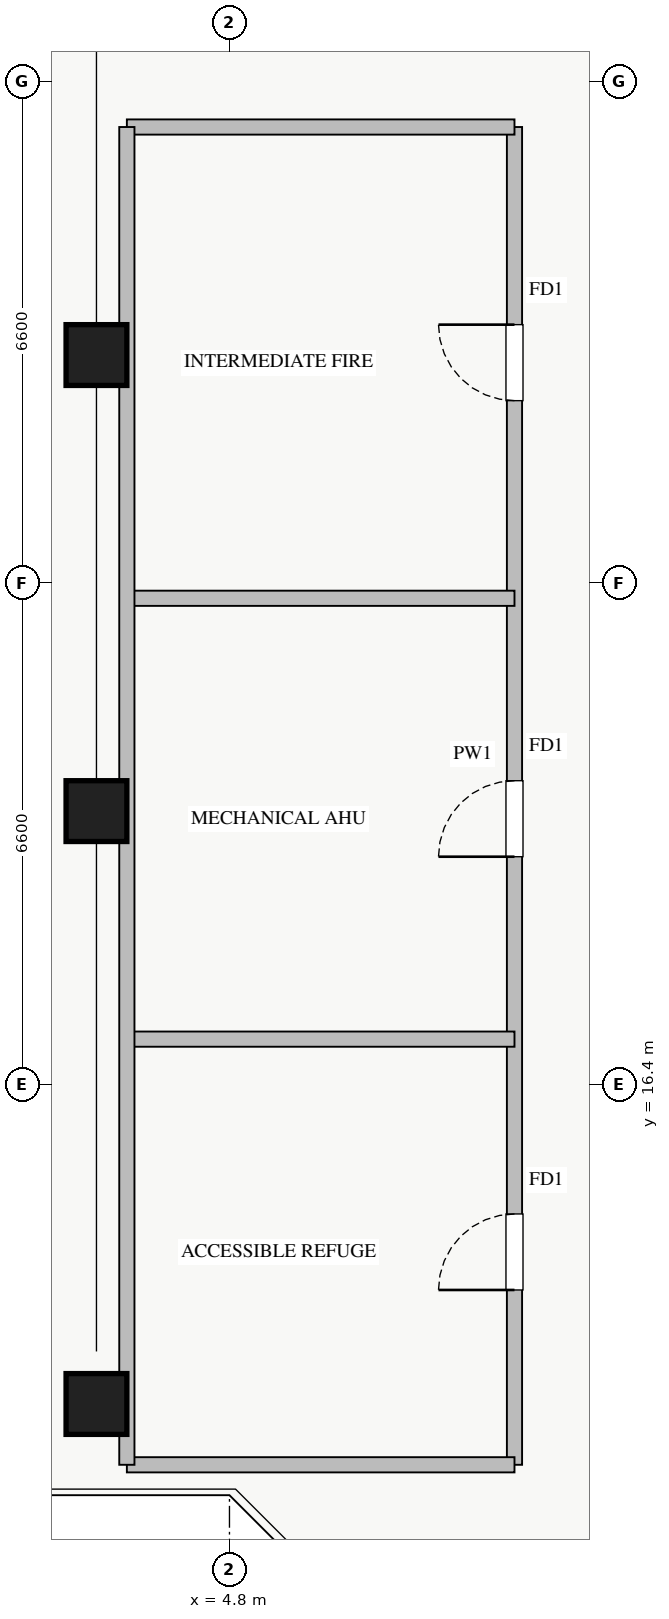
"""IFC4 building model, lengths in metres.
Left out: names, types, materials, properties, quantities, classifications, styles, units other than length and angle.
Written with IfcOpenShell. Run it as: python <this file> out.ifc"""

import sys

from ifc_helpers import new_model, si_unit, direction, frame, frame_2d, origin, origin_2d, place, context, subcontext, project, spatial, rectangle, extrude, source, transform, mapped, element, fill, save


model = new_model("IFC4")
c1 = context("Model", 3, precision=1e-05, world=origin(), true_north=direction((0.0, 1.0)))
c2 = subcontext(c1, "Body", "Model", "MODEL_VIEW")
j1 = project(units=[si_unit("LENGTHUNIT", "METRE"), si_unit("PLANEANGLEUNIT", "RADIAN")], contexts=[c1])
p1 = place(None, origin())
s1 = spatial("IfcSite", under=j1, at=p1, CompositionType="ELEMENT")
p2 = place(p1, origin())
s2 = spatial("IfcBuilding", under=s1, at=p2, CompositionType="ELEMENT")
p3 = place(p2, frame((0.0, 0.0, 232.75)))
s3 = spatial("IfcBuildingStorey", under=s2, at=p3, CompositionType="ELEMENT", Elevation=232.75)
m1 = source(origin(), c2, "Body", "SweptSolid", [
    extrude(rectangle(XDim=0.8, YDim=0.8, at=origin_2d()), origin(), (0.0, 0.0, 1.0), 4.5),
])
for number, where, z_axis, x_axis in (
    (1, (3.05, 26.0, 0.0), (0.0, 0.0, 1.0), (1.0, 0.0, 0.0)),
    (2, (3.05, 20.0, 0.0), (0.0, 0.0, 1.0), (1.0, 0.0, 0.0)),
    (3, (3.05, 12.2, 0.0), (0.0, 0.0, 1.0), (1.0, 0.0, 0.0)),
):
    element("IfcColumn", number, at=place(p3, frame(where, z_axis=z_axis, x_axis=x_axis)), inside=s3, PredefinedType="COLUMN", context=c2, shape_type="MappedRepresentation", body=[
        mapped(m1, transform((0.0, 0.0, 0.0), x_axis=(1.0, 0.0, 0.0), y_axis=(0.0, 1.0, 0.0), z_axis=(0.0, 0.0, 1.0), scale=1.0)),
    ])
p4 = place(p3, frame((8.55, 11.4, 0.0), z_axis=(0.0, 0.0, 1.0), x_axis=(0.0, 1.0, 0.0)))
e4 = element("IfcWall", 4, at=p4, inside=s3, PredefinedType="PARTITIONING", context=c2, shape_type="SweptSolid", body=[
    extrude(rectangle(XDim=17.6, YDim=0.2, at=frame_2d((8.8, 0.0))), origin(), (0.0, 0.0, 1.0), 2.515),
])
p5 = place(p4, frame((8.0, 0.0, 0.0)))
e5 = element("IfcOpeningElement", 5, at=p5, cuts=e4, PredefinedType="OPENING", context=c2, shape_type="SweptSolid", body=[
    extrude(rectangle(XDim=1.0, YDim=2.05, at=frame_2d((0.5, 1.025))), frame((0.0, 0.11, 0.0), z_axis=(0.0, -1.0, 0.0), x_axis=(1.0, 0.0, 0.0)), (0.0, 0.0, 1.0), 0.22),
])
p6 = place(p4, frame((14.0, 0.0, 0.0)))
e6 = element("IfcOpeningElement", 6, at=p6, cuts=e4, PredefinedType="OPENING", context=c2, shape_type="SweptSolid", body=[
    extrude(rectangle(XDim=1.0, YDim=2.05, at=frame_2d((0.5, 1.025))), frame((0.0, 0.11, 0.0), z_axis=(0.0, -1.0, 0.0), x_axis=(1.0, 0.0, 0.0)), (0.0, 0.0, 1.0), 0.22),
])
p7 = place(p4, frame((2.3, 0.0, 0.0)))
e7 = element("IfcOpeningElement", 7, at=p7, cuts=e4, PredefinedType="OPENING", context=c2, shape_type="SweptSolid", body=[
    extrude(rectangle(XDim=1.0, YDim=2.05, at=frame_2d((0.5, 1.025))), frame((0.0, 0.11, 0.0), z_axis=(0.0, -1.0, 0.0), x_axis=(1.0, 0.0, 0.0)), (0.0, 0.0, 1.0), 0.22),
])
for number, where, z_axis, x_axis in (
    (8, (3.45, 11.4, 0.0), (0.0, 0.0, 1.0), (1.0, 0.0, 0.0)),
    (9, (3.45, 17.0, 0.0), (0.0, 0.0, 1.0), (1.0, 0.0, 0.0)),
    (10, (3.45, 22.8, 0.0), (0.0, 0.0, 1.0), (1.0, 0.0, 0.0)),
    (11, (3.45, 29.0, 0.0), (0.0, 0.0, 1.0), (1.0, 0.0, 0.0)),
):
    element("IfcWall", number, at=place(p3, frame(where, z_axis=z_axis, x_axis=x_axis)), inside=s3, PredefinedType="PARTITIONING", context=c2, shape_type="SweptSolid", body=[
        extrude(rectangle(XDim=5.1, YDim=0.2, at=frame_2d((2.55, 0.0))), origin(), (0.0, 0.0, 1.0), 4.32),
    ])
p8 = place(p3, frame((3.45, 11.4, 0.0), z_axis=(0.0, 0.0, 1.0), x_axis=(0.0, 1.0, 0.0)))
e12 = element("IfcWall", 12, at=p8, inside=s3, PredefinedType="PARTITIONING", context=c2, shape_type="SweptSolid", body=[
    extrude(rectangle(XDim=17.6, YDim=0.2, at=frame_2d((8.8, 0.0))), origin(), (0.0, 0.0, 1.0), 1.915),
])
m2 = source(origin(), c2, "Body", "SweptSolid", [
    extrude(rectangle(XDim=1.0, YDim=2.05, at=frame_2d((0.5, 1.025))), frame((0.0, 0.025, 0.0), z_axis=(0.0, -1.0, 0.0), x_axis=(1.0, 0.0, 0.0)), (0.0, 0.0, 1.0), 0.05),
])
p9 = place(p5, origin())
e13 = element("IfcDoor", 13, at=p9, inside=s3, OperationType="SINGLE_SWING_LEFT", PredefinedType="DOOR", context=c2, shape_type="MappedRepresentation", body=[
    mapped(m2, transform((0.0, 0.0, 0.0), x_axis=(1.0, 0.0, 0.0), y_axis=(0.0, 1.0, 0.0), z_axis=(0.0, 0.0, 1.0), scale=1.0)),
])
fill(e5, e13)
p10 = place(p6, origin())
e14 = element("IfcDoor", 14, at=p10, inside=s3, OperationType="SINGLE_SWING_RIGHT", PredefinedType="DOOR", context=c2, shape_type="MappedRepresentation", body=[
    mapped(m2, transform((0.0, 0.0, 0.0), x_axis=(1.0, 0.0, 0.0), y_axis=(0.0, 1.0, 0.0), z_axis=(0.0, 0.0, 1.0), scale=1.0)),
])
fill(e6, e14)
p11 = place(p7, origin())
e15 = element("IfcDoor", 15, at=p11, inside=s3, OperationType="SINGLE_SWING_LEFT", PredefinedType="DOOR", context=c2, shape_type="MappedRepresentation", body=[
    mapped(m2, transform((0.0, 0.0, 0.0), x_axis=(1.0, 0.0, 0.0), y_axis=(0.0, 1.0, 0.0), z_axis=(0.0, 0.0, 1.0), scale=1.0)),
])
fill(e7, e15)
save(model, sys.argv[1])
